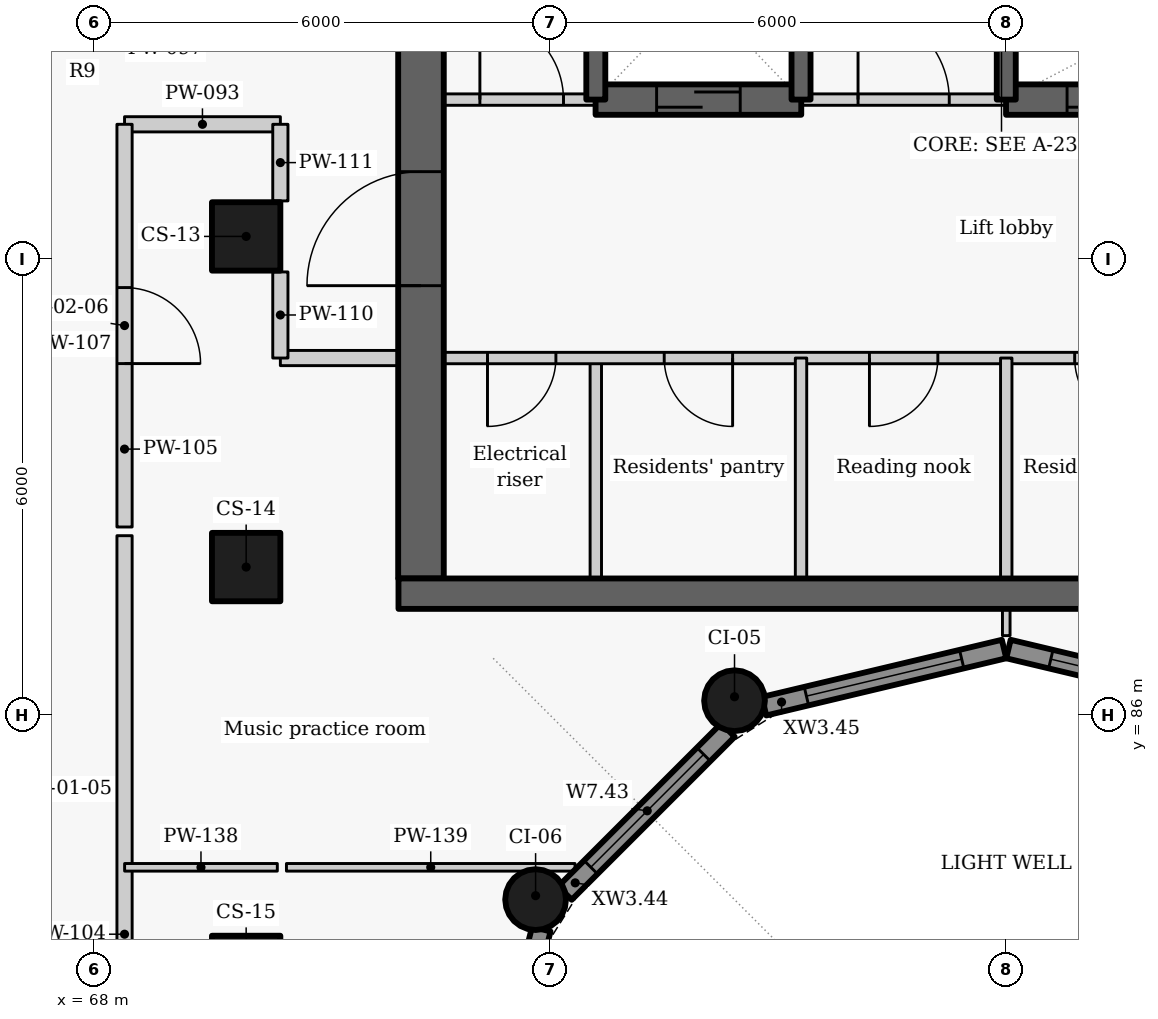
"""IFC4 building model, lengths in metres.
Left out: names, types, materials, properties, quantities, classifications, styles, units other than length and angle.
Written with IfcOpenShell. Run it as: python <this file> out.ifc"""

import sys

from ifc_helpers import new_model, si_unit, direction, frame, frame_2d, origin, origin_2d, place, context, subcontext, project, spatial, rectangle, circle, extrude, element, fill, save


model = new_model("IFC4")
c1 = context("Model", 3, precision=1e-05, world=origin(), true_north=direction((0.0, 1.0)))
c2 = subcontext(c1, "Body", "Model", "MODEL_VIEW")
j1 = project(units=[si_unit("LENGTHUNIT", "METRE"), si_unit("PLANEANGLEUNIT", "RADIAN")], contexts=[c1])
p1 = place(None, origin())
s1 = spatial("IfcSite", under=j1, at=p1, CompositionType="ELEMENT")
p2 = place(p1, origin())
s2 = spatial("IfcBuilding", under=s1, at=p2, CompositionType="ELEMENT")
p3 = place(p2, frame((0.0, 0.0, 203.1)))
s3 = spatial("IfcBuildingStorey", under=s2, at=p3, CompositionType="ELEMENT", Elevation=203.1)
for number, where, z_axis, x_axis in (
    (1, (70.0, 92.3, 0.0), (0.0, 0.0, 1.0), (0.0, -1.0, 0.0)),
    (2, (70.0, 87.95, 0.0), (0.0, 0.0, 1.0), (0.0, -1.0, 0.0)),
    (3, (70.0, 82.65, 0.0), (0.0, 0.0, 1.0), (0.0, -1.0, 0.0)),
):
    element("IfcColumn", number, at=place(p3, frame(where, z_axis=z_axis, x_axis=x_axis)), inside=s3, PredefinedType="COLUMN", context=c2, shape_type="SweptSolid", body=[
        extrude(rectangle(XDim=0.9, YDim=0.9, at=origin_2d()), origin(), (0.0, 0.0, 1.0), 3.3),
    ])
for number, where, z_axis, x_axis in (
    (4, (76.425, 86.192, 0.0), (0.0, 0.0, 1.0), (-0.866, -0.5, 0.0)),
    (5, (73.808, 83.575, 0.0), (0.0, 0.0, 1.0), (-0.5, -0.866, 0.0)),
):
    element("IfcColumn", number, at=place(p3, frame(where, z_axis=z_axis, x_axis=x_axis)), inside=s3, PredefinedType="COLUMN", context=c2, shape_type="SweptSolid", body=[
        extrude(circle(Radius=0.4, at=origin_2d()), origin(), (0.0, 0.0, 1.0), 3.3),
    ])
p4 = place(p3, frame((73.14, 80.27, 0.0), z_axis=(0.0, 0.0, 1.0), x_axis=(0.247055971283, 0.969001211069, 0.0)))
e6 = element("IfcWall", 6, at=p4, inside=s3, PredefinedType="SOLIDWALL", context=c2, shape_type="SweptSolid", body=[
    extrude(rectangle(XDim=3.01, YDim=0.25, at=frame_2d((1.505, 0.0))), origin(), (0.0, 0.0, 1.0), 2.425),
])
p5 = place(p4, frame((0.469, 0.0, 0.9)))
e7 = element("IfcOpeningElement", 7, at=p5, cuts=e6, PredefinedType="OPENING", context=c2, shape_type="SweptSolid", body=[
    extrude(rectangle(XDim=2.1, YDim=1.1, at=frame_2d((1.05, 0.55))), frame((0.0, 0.135, 0.0), z_axis=(0.0, -1.0, 0.0), x_axis=(1.0, 0.0, 0.0)), (0.0, 0.0, 1.0), 0.27),
])
p6 = place(p3, frame((74.194, 83.661, 0.0), z_axis=(0.0, 0.0, 1.0), x_axis=(0.707106781187, 0.707106781187, 0.0)))
e8 = element("IfcWall", 8, at=p6, inside=s3, PredefinedType="SOLIDWALL", context=c2, shape_type="SweptSolid", body=[
    extrude(rectangle(XDim=3.033, YDim=0.25, at=frame_2d((1.517, 0.0))), origin(), (0.0, 0.0, 1.0), 2.425),
])
p7 = place(p6, frame((0.481, 0.0, 0.9)))
e9 = element("IfcOpeningElement", 9, at=p7, cuts=e8, PredefinedType="OPENING", context=c2, shape_type="SweptSolid", body=[
    extrude(rectangle(XDim=2.1, YDim=1.1, at=frame_2d((1.05, 0.55))), frame((0.0, 0.135, 0.0), z_axis=(0.0, -1.0, 0.0), x_axis=(1.0, 0.0, 0.0)), (0.0, 0.0, 1.0), 0.27),
])
p8 = place(p3, frame((76.814, 86.119, 0.0), z_axis=(0.0, 0.0, 1.0), x_axis=(0.972773113459, 0.231759508395, 0.0)))
e10 = element("IfcWall", 10, at=p8, inside=s3, PredefinedType="SOLIDWALL", context=c2, shape_type="SweptSolid", body=[
    extrude(rectangle(XDim=3.246, YDim=0.25, at=frame_2d((1.623, 0.0))), origin(), (0.0, 0.0, 1.0), 2.425),
])
p9 = place(p8, frame((0.573, 0.0, 0.9)))
e11 = element("IfcOpeningElement", 11, at=p9, cuts=e10, PredefinedType="OPENING", context=c2, shape_type="SweptSolid", body=[
    extrude(rectangle(XDim=2.1, YDim=1.1, at=frame_2d((1.05, 0.55))), frame((0.0, 0.135, 0.0), z_axis=(0.0, -1.0, 0.0), x_axis=(1.0, 0.0, 0.0)), (0.0, 0.0, 1.0), 0.27),
])
p10 = place(p3, frame((80.029, 86.872, 0.0), z_axis=(0.0, 0.0, 1.0), x_axis=(0.972773113459, -0.231759508395, 0.0)))
e12 = element("IfcWall", 12, at=p10, inside=s3, PredefinedType="SOLIDWALL", context=c2, shape_type="SweptSolid", body=[
    extrude(rectangle(XDim=3.246, YDim=0.25, at=frame_2d((1.623, 0.0))), origin(), (0.0, 0.0, 1.0), 2.425),
])
p11 = place(p10, frame((0.573, 0.0, 0.9)))
e13 = element("IfcOpeningElement", 13, at=p11, cuts=e12, PredefinedType="OPENING", context=c2, shape_type="SweptSolid", body=[
    extrude(rectangle(XDim=2.1, YDim=1.1, at=frame_2d((1.05, 0.55))), frame((0.0, 0.135, 0.0), z_axis=(0.0, -1.0, 0.0), x_axis=(1.0, 0.0, 0.0)), (0.0, 0.0, 1.0), 0.27),
])
p12 = place(p3, frame((74.6, 87.8, 0.0), z_axis=(0.0, 0.0, 1.0), x_axis=(0.0, 1.0, 0.0)))
e14 = element("IfcWall", 14, at=p12, inside=s3, PredefinedType="PARTITIONING", context=c2, shape_type="SweptSolid", body=[
    extrude(rectangle(XDim=2.9, YDim=0.15, at=frame_2d((1.45, 0.0))), origin(), (0.0, 0.0, 1.0), 3.025),
])
p13 = place(p3, frame((85.4, 90.7, 0.0), z_axis=(0.0, 0.0, 1.0), x_axis=(-1.0, 0.0, 0.0)))
e15 = element("IfcWall", 15, at=p13, inside=s3, PredefinedType="PARTITIONING", context=c2, shape_type="SweptSolid", body=[
    extrude(rectangle(XDim=13.4, YDim=0.15, at=frame_2d((6.7, 0.0))), origin(), (0.0, 0.0, 1.0), 3.025),
])
p14 = place(p13, frame((11.325, 0.0, 0.0)))
e16 = element("IfcOpeningElement", 16, at=p14, cuts=e15, PredefinedType="OPENING", context=c2, shape_type="SweptSolid", body=[
    extrude(rectangle(XDim=0.9, YDim=2.1, at=frame_2d((0.45, 1.05))), frame((0.0, 0.085, 0.0), z_axis=(0.0, -1.0, 0.0), x_axis=(1.0, 0.0, 0.0)), (0.0, 0.0, 1.0), 0.17),
])
p15 = place(p13, frame((9.0, 0.0, 0.0)))
e17 = element("IfcOpeningElement", 17, at=p15, cuts=e15, PredefinedType="OPENING", context=c2, shape_type="SweptSolid", body=[
    extrude(rectangle(XDim=0.9, YDim=2.1, at=frame_2d((0.45, 1.05))), frame((0.0, 0.085, 0.0), z_axis=(0.0, -1.0, 0.0), x_axis=(1.0, 0.0, 0.0)), (0.0, 0.0, 1.0), 0.17),
])
p16 = place(p13, frame((6.3, 0.0, 0.0)))
e18 = element("IfcOpeningElement", 18, at=p16, cuts=e15, PredefinedType="OPENING", context=c2, shape_type="SweptSolid", body=[
    extrude(rectangle(XDim=0.9, YDim=2.1, at=frame_2d((0.45, 1.05))), frame((0.0, 0.085, 0.0), z_axis=(0.0, -1.0, 0.0), x_axis=(1.0, 0.0, 0.0)), (0.0, 0.0, 1.0), 0.17),
])
p17 = place(p13, frame((3.6, 0.0, 0.0)))
e19 = element("IfcOpeningElement", 19, at=p17, cuts=e15, PredefinedType="OPENING", context=c2, shape_type="SweptSolid", body=[
    extrude(rectangle(XDim=0.9, YDim=2.1, at=frame_2d((0.45, 1.05))), frame((0.0, 0.085, 0.0), z_axis=(0.0, -1.0, 0.0), x_axis=(1.0, 0.0, 0.0)), (0.0, 0.0, 1.0), 0.17),
])
p18 = place(p13, frame((0.9, 0.0, 0.0)))
e20 = element("IfcOpeningElement", 20, at=p18, cuts=e15, PredefinedType="OPENING", context=c2, shape_type="SweptSolid", body=[
    extrude(rectangle(XDim=0.9, YDim=2.1, at=frame_2d((0.45, 1.05))), frame((0.0, 0.085, 0.0), z_axis=(0.0, -1.0, 0.0), x_axis=(1.0, 0.0, 0.0)), (0.0, 0.0, 1.0), 0.17),
])
p19 = place(p3, frame((72.3, 87.8, -0.275), z_axis=(0.0, 0.0, 1.0), x_axis=(0.0, 1.0, 0.0)))
e21 = element("IfcWall", 21, at=p19, inside=s3, PredefinedType="SHEAR", context=c2, shape_type="SweptSolid", body=[
    extrude(rectangle(XDim=9.1, YDim=0.6, at=frame_2d((4.55, 0.0))), origin(), (0.0, 0.0, 1.0), 3.3),
])
p20 = place(p19, frame((3.852, 0.0, 0.275)))
e22 = element("IfcOpeningElement", 22, at=p20, cuts=e21, PredefinedType="OPENING", context=c2, shape_type="SweptSolid", body=[
    extrude(rectangle(XDim=1.5, YDim=2.1, at=frame_2d((0.75, 1.05))), frame((0.0, 0.31, 0.0), z_axis=(0.0, -1.0, 0.0), x_axis=(1.0, 0.0, 0.0)), (0.0, 0.0, 1.0), 0.62),
])
for number, where, z_axis, x_axis in (
    (23, (77.3, 87.8, 0.0), (0.0, 0.0, 1.0), (0.0, 1.0, 0.0)),
    (24, (80.0, 87.8, 0.0), (0.0, 0.0, 1.0), (0.0, 1.0, 0.0)),
):
    element("IfcWall", number, at=place(p3, frame(where, z_axis=z_axis, x_axis=x_axis)), inside=s3, PredefinedType="PARTITIONING", context=c2, shape_type="SweptSolid", body=[
        extrude(rectangle(XDim=2.9, YDim=0.15, at=frame_2d((1.45, 0.0))), origin(), (0.0, 0.0, 1.0), 3.025),
    ])
p21 = place(p3, frame((72.0, 94.1, 0.0), z_axis=(0.0, 0.0, 1.0), x_axis=(1.0, 0.0, 0.0)))
e25 = element("IfcWall", 25, at=p21, inside=s3, PredefinedType="PARTITIONING", context=c2, shape_type="SweptSolid", body=[
    extrude(rectangle(XDim=2.603, YDim=0.15, at=frame_2d((1.302, 0.0))), origin(), (0.0, 0.0, 1.0), 3.025),
])
p22 = place(p21, frame((1.075, 0.0, 0.0)))
e26 = element("IfcOpeningElement", 26, at=p22, cuts=e25, PredefinedType="OPENING", context=c2, shape_type="SweptSolid", body=[
    extrude(rectangle(XDim=1.1, YDim=2.1, at=frame_2d((0.55, 1.05))), frame((0.0, 0.085, 0.0), z_axis=(0.0, -1.0, 0.0), x_axis=(1.0, 0.0, 0.0)), (0.0, 0.0, 1.0), 0.17),
])
p23 = place(p3, frame((77.297, 94.1, 0.0), z_axis=(0.0, 0.0, 1.0), x_axis=(1.0, 0.0, 0.0)))
e27 = element("IfcWall", 27, at=p23, inside=s3, PredefinedType="PARTITIONING", context=c2, shape_type="SweptSolid", body=[
    extrude(rectangle(XDim=2.706, YDim=0.15, at=frame_2d((1.353, 0.0))), origin(), (0.0, 0.0, 1.0), 3.025),
])
p24 = place(p23, frame((0.753, 0.0, 0.0)))
e28 = element("IfcOpeningElement", 28, at=p24, cuts=e27, PredefinedType="OPENING", context=c2, shape_type="SweptSolid", body=[
    extrude(rectangle(XDim=1.2, YDim=2.1, at=frame_2d((0.6, 1.05))), frame((0.0, 0.085, 0.0), z_axis=(0.0, -1.0, 0.0), x_axis=(1.0, 0.0, 0.0)), (0.0, 0.0, 1.0), 0.17),
])
p25 = place(p3, frame((74.597, 94.1, -0.275), z_axis=(0.0, 0.0, 1.0), x_axis=(1.0, 0.0, 0.0)))
e29 = element("IfcWall", 29, at=p25, inside=s3, PredefinedType="SHEAR", context=c2, shape_type="SweptSolid", body=[
    extrude(rectangle(XDim=2.706, YDim=0.4, at=frame_2d((1.353, 0.0))), origin(), (0.0, 0.0, 1.0), 3.3),
])
p26 = place(p25, frame((0.803, 0.0, 0.275)))
e30 = element("IfcOpeningElement", 30, at=p26, cuts=e29, PredefinedType="OPENING", context=c2, shape_type="SweptSolid", body=[
    extrude(rectangle(XDim=1.1, YDim=2.1, at=frame_2d((0.55, 1.05))), frame((0.0, 0.21, 0.0), z_axis=(0.0, -1.0, 0.0), x_axis=(1.0, 0.0, 0.0)), (0.0, 0.0, 1.0), 0.42),
])
p27 = place(p3, frame((79.997, 94.1, -0.275), z_axis=(0.0, 0.0, 1.0), x_axis=(1.0, 0.0, 0.0)))
e31 = element("IfcWall", 31, at=p27, inside=s3, PredefinedType="SHEAR", context=c2, shape_type="SweptSolid", body=[
    extrude(rectangle(XDim=5.406, YDim=0.4, at=frame_2d((2.703, 0.0))), origin(), (0.0, 0.0, 1.0), 3.3),
])
p28 = place(p27, frame((0.803, 0.0, 0.275)))
e32 = element("IfcOpeningElement", 32, at=p28, cuts=e31, PredefinedType="OPENING", context=c2, shape_type="SweptSolid", body=[
    extrude(rectangle(XDim=1.1, YDim=2.1, at=frame_2d((0.55, 1.05))), frame((0.0, 0.21, 0.0), z_axis=(0.0, -1.0, 0.0), x_axis=(1.0, 0.0, 0.0)), (0.0, 0.0, 1.0), 0.42),
])
for number, where, z_axis, x_axis in (
    (33, (74.6, 94.1, -0.275), (0.0, 0.0, 1.0), (0.0, 1.0, 0.0)),
    (34, (77.3, 94.1, -0.275), (0.0, 0.0, 1.0), (0.0, 1.0, 0.0)),
    (35, (80.0, 94.1, -0.275), (0.0, 0.0, 1.0), (0.0, 1.0, 0.0)),
):
    element("IfcWall", number, at=place(p3, frame(where, z_axis=z_axis, x_axis=x_axis)), inside=s3, PredefinedType="SHEAR", context=c2, shape_type="SweptSolid", body=[
        extrude(rectangle(XDim=2.8, YDim=0.25, at=frame_2d((1.4, 0.0))), origin(), (0.0, 0.0, 1.0), 3.3),
    ])
p29 = place(p3, frame((68.4, 93.775, 0.0), z_axis=(0.0, 0.0, 1.0), x_axis=(1.0, 0.0, 0.0)))
e36 = element("IfcWall", 36, at=p29, inside=s3, PredefinedType="PARTITIONING", context=c2, shape_type="SweptSolid", body=[
    extrude(rectangle(XDim=2.05, YDim=0.2, at=frame_2d((1.025, 0.0))), origin(), (0.0, 0.0, 1.0), 2.505),
])
p30 = place(p3, frame((70.45, 90.7, 0.0), z_axis=(0.0, 0.0, 1.0), x_axis=(1.0, 0.0, 0.0)))
e37 = element("IfcWall", 37, at=p30, inside=s3, PredefinedType="PARTITIONING", context=c2, shape_type="SweptSolid", body=[
    extrude(rectangle(XDim=1.55, YDim=0.2, at=frame_2d((0.775, 0.0))), origin(), (0.0, 0.0, 1.0), 3.025),
])
p31 = place(p3, frame((68.4, 77.877, 0.0), z_axis=(0.0, 0.0, 1.0), x_axis=(0.0, 1.0, 0.0)))
e38 = element("IfcWall", 38, at=p31, inside=s3, PredefinedType="PARTITIONING", context=c2, shape_type="SweptSolid", body=[
    extrude(rectangle(XDim=10.486, YDim=0.2, at=frame_2d((5.243, 0.0))), origin(), (0.0, 0.0, 1.0), 3.025),
])
p32 = place(p3, frame((68.4, 93.775, 0.0), z_axis=(0.0, 0.0, 1.0), x_axis=(0.0, -1.0, 0.0)))
e39 = element("IfcWall", 39, at=p32, inside=s3, PredefinedType="PARTITIONING", context=c2, shape_type="SweptSolid", body=[
    extrude(rectangle(XDim=5.298, YDim=0.2, at=frame_2d((2.649, 0.0))), origin(), (0.0, 0.0, 1.0), 3.025),
])
p33 = place(p32, frame((2.148, 0.0, 0.0)))
e40 = element("IfcOpeningElement", 40, at=p33, cuts=e39, PredefinedType="OPENING", context=c2, shape_type="SweptSolid", body=[
    extrude(rectangle(XDim=1.0, YDim=2.1, at=frame_2d((0.5, 1.05))), frame((0.0, 0.11, 0.0), z_axis=(0.0, -1.0, 0.0), x_axis=(1.0, 0.0, 0.0)), (0.0, 0.0, 1.0), 0.22),
])
p34 = place(p3, frame((70.45, 90.7, 0.0), z_axis=(0.0, 0.0, 1.0), x_axis=(0.0, 1.0, 0.0)))
e41 = element("IfcWall", 41, at=p34, inside=s3, PredefinedType="PARTITIONING", context=c2, shape_type="SweptSolid", body=[
    extrude(rectangle(XDim=1.133, YDim=0.2, at=frame_2d((0.566, 0.0))), origin(), (0.0, 0.0, 1.0), 3.025),
])
p35 = place(p3, frame((70.45, 92.767, 0.0), z_axis=(0.0, 0.0, 1.0), x_axis=(0.0, 1.0, 0.0)))
e42 = element("IfcWall", 42, at=p35, inside=s3, PredefinedType="PARTITIONING", context=c2, shape_type="SweptSolid", body=[
    extrude(rectangle(XDim=1.008, YDim=0.2, at=frame_2d((0.504, 0.0))), origin(), (0.0, 0.0, 1.0), 3.025),
])
p36 = place(p3, frame((80.0, 87.048, 0.0), z_axis=(0.0, 0.0, 1.0), x_axis=(0.0, 1.0, 0.0)))
e43 = element("IfcWall", 43, at=p36, inside=s3, PredefinedType="PARTITIONING", context=c2, shape_type="SweptSolid", body=[
    extrude(rectangle(XDim=0.352, YDim=0.1, at=frame_2d((0.176, 0.0))), origin(), (0.0, 0.0, 1.0), 3.025),
])
p37 = place(p3, frame((68.401, 84.0, 0.0), z_axis=(0.0, 0.0, 1.0), x_axis=(1.0, 0.0, 0.0)))
e44 = element("IfcWall", 44, at=p37, inside=s3, PredefinedType="PARTITIONING", context=c2, shape_type="SweptSolid", body=[
    extrude(rectangle(XDim=2.009, YDim=0.1, at=frame_2d((1.004, 0.0))), origin(), (0.0, 0.0, 1.0), 2.505),
])
p38 = place(p3, frame((70.53, 84.0, 0.0), z_axis=(0.0, 0.0, 1.0), x_axis=(1.0, 0.0, 0.0)))
e45 = element("IfcWall", 45, at=p38, inside=s3, PredefinedType="PARTITIONING", context=c2, shape_type="SweptSolid", body=[
    extrude(rectangle(XDim=3.797, YDim=0.1, at=frame_2d((1.898, 0.0))), origin(), (0.0, 0.0, 1.0), 2.505),
])
p39 = place(p3, frame((72.004, 87.6, -0.275), z_axis=(0.0, 0.0, 1.0), x_axis=(1.0, 0.0, 0.0)))
e46 = element("IfcWall", 46, at=p39, inside=s3, PredefinedType="SHEAR", context=c2, shape_type="SweptSolid", body=[
    extrude(rectangle(XDim=15.992, YDim=0.4, at=frame_2d((7.996, 0.0))), origin(), (0.0, 0.0, 1.0), 3.3),
])
p40 = place(p7, origin())
e47 = element("IfcWindow", 47, at=p40, inside=s3, PartitioningType="SINGLE_PANEL", PredefinedType="WINDOW", context=c2, shape_type="SweptSolid", body=[
    extrude(rectangle(XDim=2.1, YDim=1.1, at=frame_2d((1.05, 0.55))), frame((0.0, 0.03, 0.0), z_axis=(0.0, -1.0, 0.0), x_axis=(1.0, 0.0, 0.0)), (0.0, 0.0, 1.0), 0.06),
])
fill(e9, e47)
p41 = place(p9, origin())
e48 = element("IfcWindow", 48, at=p41, inside=s3, PartitioningType="SINGLE_PANEL", PredefinedType="WINDOW", context=c2, shape_type="SweptSolid", body=[
    extrude(rectangle(XDim=2.1, YDim=1.1, at=frame_2d((1.05, 0.55))), frame((0.0, 0.03, 0.0), z_axis=(0.0, -1.0, 0.0), x_axis=(1.0, 0.0, 0.0)), (0.0, 0.0, 1.0), 0.06),
])
fill(e11, e48)
p42 = place(p11, origin())
e49 = element("IfcWindow", 49, at=p42, inside=s3, PartitioningType="SINGLE_PANEL", PredefinedType="WINDOW", context=c2, shape_type="SweptSolid", body=[
    extrude(rectangle(XDim=2.1, YDim=1.1, at=frame_2d((1.05, 0.55))), frame((0.0, 0.03, 0.0), z_axis=(0.0, -1.0, 0.0), x_axis=(1.0, 0.0, 0.0)), (0.0, 0.0, 1.0), 0.06),
])
fill(e13, e49)
p43 = place(p14, origin())
e50 = element("IfcDoor", 50, at=p43, inside=s3, OperationType="SINGLE_SWING_RIGHT", PredefinedType="DOOR", context=c2, shape_type="SweptSolid", body=[
    extrude(rectangle(XDim=0.9, YDim=2.1, at=frame_2d((0.45, 1.05))), frame((0.0, 0.025, 0.0), z_axis=(0.0, -1.0, 0.0), x_axis=(1.0, 0.0, 0.0)), (0.0, 0.0, 1.0), 0.05),
])
fill(e16, e50)
p44 = place(p15, origin())
e51 = element("IfcDoor", 51, at=p44, inside=s3, OperationType="SINGLE_SWING_LEFT", PredefinedType="DOOR", context=c2, shape_type="SweptSolid", body=[
    extrude(rectangle(XDim=0.9, YDim=2.1, at=frame_2d((0.45, 1.05))), frame((0.0, 0.025, 0.0), z_axis=(0.0, -1.0, 0.0), x_axis=(1.0, 0.0, 0.0)), (0.0, 0.0, 1.0), 0.05),
])
fill(e17, e51)
p45 = place(p16, origin())
e52 = element("IfcDoor", 52, at=p45, inside=s3, OperationType="SINGLE_SWING_RIGHT", PredefinedType="DOOR", context=c2, shape_type="SweptSolid", body=[
    extrude(rectangle(XDim=0.9, YDim=2.1, at=frame_2d((0.45, 1.05))), frame((0.0, 0.025, 0.0), z_axis=(0.0, -1.0, 0.0), x_axis=(1.0, 0.0, 0.0)), (0.0, 0.0, 1.0), 0.05),
])
fill(e18, e52)
p46 = place(p17, origin())
e53 = element("IfcDoor", 53, at=p46, inside=s3, OperationType="SINGLE_SWING_LEFT", PredefinedType="DOOR", context=c2, shape_type="SweptSolid", body=[
    extrude(rectangle(XDim=0.9, YDim=2.1, at=frame_2d((0.45, 1.05))), frame((0.0, 0.025, 0.0), z_axis=(0.0, -1.0, 0.0), x_axis=(1.0, 0.0, 0.0)), (0.0, 0.0, 1.0), 0.05),
])
fill(e19, e53)
p47 = place(p22, origin())
e54 = element("IfcDoor", 54, at=p47, inside=s3, OperationType="SINGLE_SWING_LEFT", PredefinedType="DOOR", context=c2, shape_type="SweptSolid", body=[
    extrude(rectangle(XDim=1.1, YDim=2.1, at=frame_2d((0.55, 1.05))), frame((0.0, 0.025, 0.0), z_axis=(0.0, -1.0, 0.0), x_axis=(1.0, 0.0, 0.0)), (0.0, 0.0, 1.0), 0.05),
])
fill(e26, e54)
p48 = place(p26, origin())
e55 = element("IfcDoor", 55, at=p48, inside=s3, OperationType="SLIDING_TO_LEFT", PredefinedType="DOOR", context=c2, shape_type="SweptSolid", body=[
    extrude(rectangle(XDim=1.1, YDim=2.1, at=frame_2d((0.55, 1.05))), frame((0.0, 0.025, 0.0), z_axis=(0.0, -1.0, 0.0), x_axis=(1.0, 0.0, 0.0)), (0.0, 0.0, 1.0), 0.05),
])
fill(e30, e55)
p49 = place(p24, origin())
e56 = element("IfcDoor", 56, at=p49, inside=s3, OperationType="DOUBLE_DOOR_SINGLE_SWING", PredefinedType="DOOR", context=c2, shape_type="SweptSolid", body=[
    extrude(rectangle(XDim=1.2, YDim=2.1, at=frame_2d((0.6, 1.05))), frame((0.0, 0.025, 0.0), z_axis=(0.0, -1.0, 0.0), x_axis=(1.0, 0.0, 0.0)), (0.0, 0.0, 1.0), 0.05),
])
fill(e28, e56)
p50 = place(p28, origin())
e57 = element("IfcDoor", 57, at=p50, inside=s3, OperationType="SLIDING_TO_LEFT", PredefinedType="DOOR", context=c2, shape_type="SweptSolid", body=[
    extrude(rectangle(XDim=1.1, YDim=2.1, at=frame_2d((0.55, 1.05))), frame((0.0, 0.025, 0.0), z_axis=(0.0, -1.0, 0.0), x_axis=(1.0, 0.0, 0.0)), (0.0, 0.0, 1.0), 0.05),
])
fill(e32, e57)
p51 = place(p33, origin())
e58 = element("IfcDoor", 58, at=p51, inside=s3, OperationType="SINGLE_SWING_RIGHT", PredefinedType="DOOR", context=c2, shape_type="SweptSolid", body=[
    extrude(rectangle(XDim=1.0, YDim=2.1, at=frame_2d((0.5, 1.05))), frame((0.0, 0.025, 0.0), z_axis=(0.0, -1.0, 0.0), x_axis=(1.0, 0.0, 0.0)), (0.0, 0.0, 1.0), 0.05),
])
fill(e40, e58)
p52 = place(p20, origin())
e59 = element("IfcDoor", 59, at=p52, inside=s3, OperationType="DOUBLE_DOOR_SINGLE_SWING", PredefinedType="DOOR", context=c2, shape_type="SweptSolid", body=[
    extrude(rectangle(XDim=1.5, YDim=2.1, at=frame_2d((0.75, 1.05))), frame((0.0, 0.025, 0.0), z_axis=(0.0, -1.0, 0.0), x_axis=(1.0, 0.0, 0.0)), (0.0, 0.0, 1.0), 0.05),
])
fill(e22, e59)
save(model, sys.argv[1])
